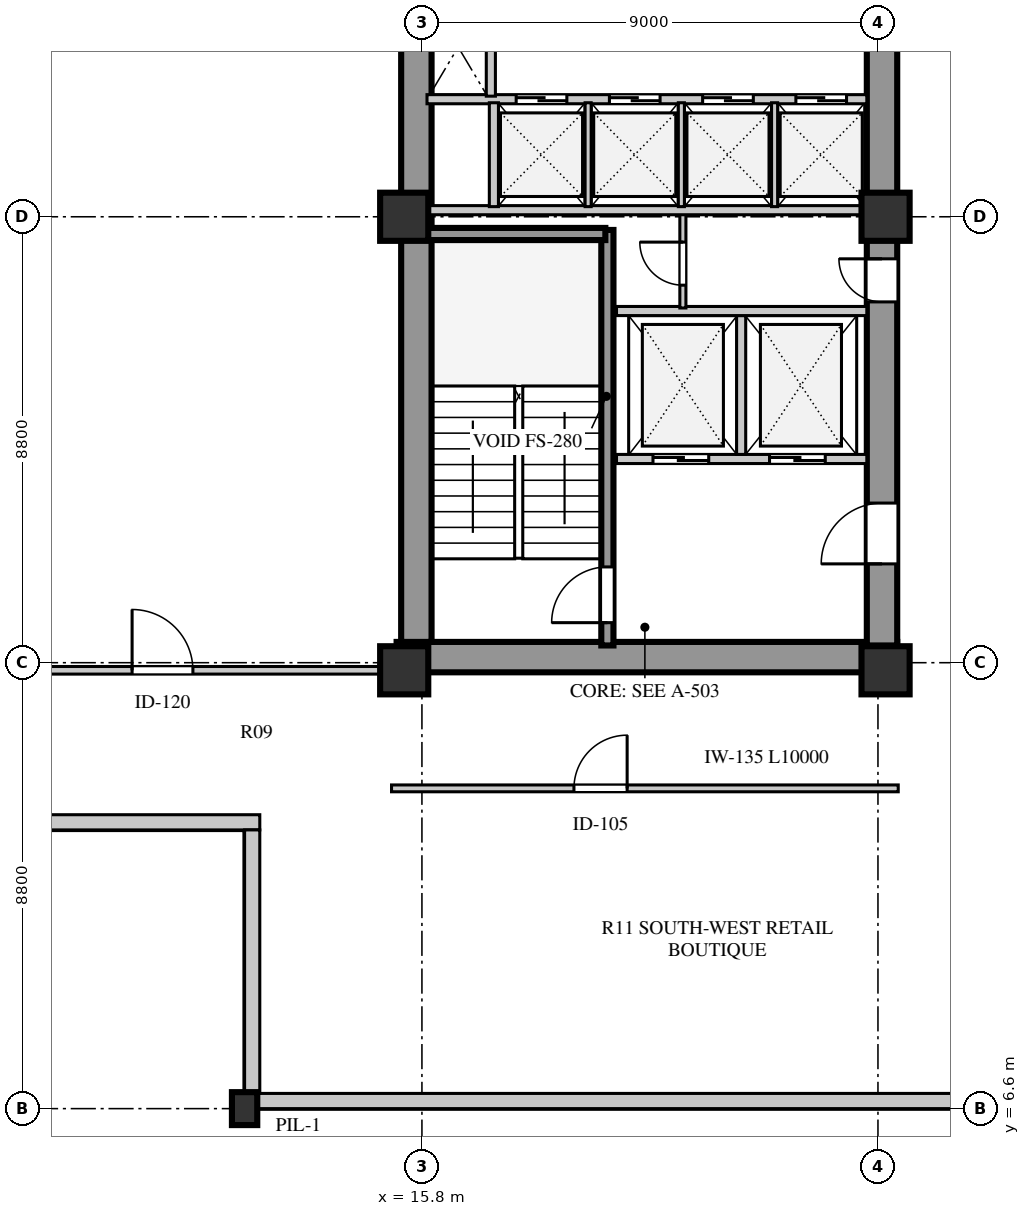
"""IFC4 building model, lengths in metres.
Left out: names, types, materials, properties, quantities, classifications, styles, units other than length and angle.
Written with IfcOpenShell. Run it as: python <this file> out.ifc"""

import sys

from ifc_helpers import new_model, si_unit, direction, frame, frame_2d, origin, origin_2d, place, context, subcontext, project, spatial, rectangle, extrude, element, fill, save


model = new_model("IFC4")
c1 = context("Model", 3, precision=1e-05, world=origin(), true_north=direction((0.0, 1.0)))
c2 = subcontext(c1, "Body", "Model", "MODEL_VIEW")
j1 = project(units=[si_unit("LENGTHUNIT", "METRE"), si_unit("PLANEANGLEUNIT", "RADIAN")], contexts=[c1])
p1 = place(None, origin())
s1 = spatial("IfcSite", under=j1, at=p1, CompositionType="ELEMENT")
p2 = place(p1, origin())
s2 = spatial("IfcBuilding", under=s1, at=p2, CompositionType="ELEMENT")
p3 = place(p2, frame((0.0, 0.0, 12.5)))
s3 = spatial("IfcBuildingStorey", under=s2, at=p3, CompositionType="ELEMENT", Elevation=12.5)
p4 = place(p3, frame((15.3, 15.51, 0.0), z_axis=(0.0, 0.0, 1.0), x_axis=(1.0, 0.0, 0.0)))
e1 = element("IfcWall", 1, at=p4, inside=s3, PredefinedType="SHEAR", context=c2, shape_type="SweptSolid", body=[
    extrude(rectangle(XDim=9.88, YDim=0.6, at=frame_2d((4.94, 0.0))), origin(), (0.0, 0.0, 1.0), 4.22),
])
p5 = place(p3, frame((15.69, 15.81, 0.0), z_axis=(0.0, 0.0, 1.0), x_axis=(0.0, 1.0, 0.0)))
e2 = element("IfcWall", 2, at=p5, inside=s3, PredefinedType="SHEAR", context=c2, shape_type="SweptSolid", body=[
    extrude(rectangle(XDim=25.63, YDim=0.6, at=frame_2d((12.815, 0.0))), origin(), (0.0, 0.0, 1.0), 4.22),
])
p6 = place(p3, frame((24.88, 15.74, 0.0), z_axis=(0.0, 0.0, 1.0), x_axis=(0.0, 1.0, 0.0)))
e3 = element("IfcWall", 3, at=p6, inside=s3, PredefinedType="SHEAR", context=c2, shape_type="SweptSolid", body=[
    extrude(rectangle(XDim=25.76, YDim=0.6, at=frame_2d((12.88, 0.0))), origin(), (0.0, 0.0, 1.0), 4.22),
])
p7 = place(p6, frame((1.61, 0.0, 0.0)))
e4 = element("IfcOpeningElement", 4, at=p7, cuts=e3, PredefinedType="OPENING", context=c2, shape_type="SweptSolid", body=[
    extrude(rectangle(XDim=1.2, YDim=2.1, at=frame_2d((0.6, 1.05))), frame((0.0, 0.31, 0.0), z_axis=(0.0, -1.0, 0.0), x_axis=(1.0, 0.0, 0.0)), (0.0, 0.0, 1.0), 0.62),
])
p8 = place(p6, frame((6.78, 0.0, 0.0)))
e5 = element("IfcOpeningElement", 5, at=p8, cuts=e3, PredefinedType="OPENING", context=c2, shape_type="SweptSolid", body=[
    extrude(rectangle(XDim=0.85, YDim=2.06, at=frame_2d((0.425, 1.03))), frame((0.0, 0.31, 0.0), z_axis=(0.0, -1.0, 0.0), x_axis=(1.0, 0.0, 0.0)), (0.0, 0.0, 1.0), 0.62),
])
p9 = place(p6, frame((12.11, 0.0, 0.0)))
e6 = element("IfcOpeningElement", 6, at=p9, cuts=e3, PredefinedType="OPENING", context=c2, shape_type="SweptSolid", body=[
    extrude(rectangle(XDim=1.5, YDim=2.12, at=frame_2d((0.75, 1.06))), frame((0.0, 0.31, 0.0), z_axis=(0.0, -1.0, 0.0), x_axis=(1.0, 0.0, 0.0)), (0.0, 0.0, 1.0), 0.62),
])
p10 = place(p6, frame((20.11, 0.0, 0.0)))
e7 = element("IfcOpeningElement", 7, at=p10, cuts=e3, PredefinedType="OPENING", context=c2, shape_type="SweptSolid", body=[
    extrude(rectangle(XDim=1.2, YDim=2.12, at=frame_2d((0.6, 1.06))), frame((0.0, 0.31, 0.0), z_axis=(0.0, -1.0, 0.0), x_axis=(1.0, 0.0, 0.0)), (0.0, 0.0, 1.0), 0.62),
])
p11 = place(p6, frame((24.01, 0.0, 0.0)))
e8 = element("IfcOpeningElement", 8, at=p11, cuts=e3, PredefinedType="OPENING", context=c2, shape_type="SweptSolid", body=[
    extrude(rectangle(XDim=0.95, YDim=2.1, at=frame_2d((0.475, 1.05))), frame((0.0, 0.31, 0.0), z_axis=(0.0, -1.0, 0.0), x_axis=(1.0, 0.0, 0.0)), (0.0, 0.0, 1.0), 0.62),
])
for number, where, z_axis, x_axis in (
    (9, (15.45, 15.25, 0.0), (0.0, 0.0, 1.0), (1.0, 0.0, 0.0)),
    (10, (15.45, 24.2, 0.0), (0.0, 0.0, 1.0), (1.0, 0.0, 0.0)),
    (11, (24.95, 15.25, 0.0), (0.0, 0.0, 1.0), (1.0, 0.0, 0.0)),
    (12, (24.95, 24.2, 0.0), (0.0, 0.0, 1.0), (1.0, 0.0, 0.0)),
):
    element("IfcColumn", number, at=place(p3, frame(where, z_axis=z_axis, x_axis=x_axis)), inside=s3, PredefinedType="COLUMN", context=c2, shape_type="SweptSolid", body=[
        extrude(rectangle(XDim=0.95, YDim=0.95, at=origin_2d()), origin(), (0.0, 0.0, 1.0), 4.22),
    ])
p12 = place(p3, frame((12.3, 6.6, 0.0), z_axis=(0.0, 0.0, 1.0), x_axis=(1.0, 0.0, 0.0)))
e13 = element("IfcColumn", 13, at=p12, inside=s3, PredefinedType="PILASTER", context=c2, shape_type="SweptSolid", body=[
    extrude(rectangle(XDim=0.5, YDim=0.65, at=origin_2d()), origin(), (0.0, 0.0, 1.0), 4.22),
])
p13 = place(p3, frame((12.3, 6.75, 0.0), z_axis=(0.0, 0.0, 1.0), x_axis=(1.0, 0.0, 0.0)))
e14 = element("IfcWall", 14, at=p13, inside=s3, PredefinedType="STANDARD", context=c2, shape_type="SweptSolid", body=[
    extrude(rectangle(XDim=34.0, YDim=0.3, at=frame_2d((17.0, 0.0))), origin(), (0.0, 0.0, 1.0), 4.22),
])
p14 = place(p13, frame((16.4, 0.0, 0.8)))
e15 = element("IfcOpeningElement", 15, at=p14, cuts=e14, PredefinedType="OPENING", context=c2, shape_type="SweptSolid", body=[
    extrude(rectangle(XDim=1.2, YDim=1.75, at=frame_2d((0.6, 0.875))), frame((0.0, 0.16, 0.0), z_axis=(0.0, -1.0, 0.0), x_axis=(1.0, 0.0, 0.0)), (0.0, 0.0, 1.0), 0.32),
])
p15 = place(p3, frame((6.8, 12.25, 0.0), z_axis=(0.0, 0.0, 1.0), x_axis=(1.0, 0.0, 0.0)))
e16 = element("IfcWall", 16, at=p15, inside=s3, PredefinedType="STANDARD", context=c2, shape_type="SweptSolid", body=[
    extrude(rectangle(XDim=5.8, YDim=0.3, at=frame_2d((2.9, 0.0))), origin(), (0.0, 0.0, 1.0), 4.22),
])
p16 = place(p3, frame((12.45, 12.1, 0.0), z_axis=(0.0, 0.0, 1.0), x_axis=(0.0, -1.0, 0.0)))
e17 = element("IfcWall", 17, at=p16, inside=s3, PredefinedType="STANDARD", context=c2, shape_type="SweptSolid", body=[
    extrude(rectangle(XDim=5.2, YDim=0.3, at=frame_2d((2.6, 0.0))), origin(), (0.0, 0.0, 1.0), 4.22),
])
p17 = place(p3, frame((19.46, 15.74, 0.0), z_axis=(0.0, 0.0, 1.0), x_axis=(0.0, 1.0, 0.0)))
e18 = element("IfcWall", 18, at=p17, inside=s3, PredefinedType="SHEAR", context=c2, shape_type="SweptSolid", body=[
    extrude(rectangle(XDim=8.2, YDim=0.24, at=frame_2d((4.1, 0.0))), origin(), (0.0, 0.0, 1.0), 4.5),
])
p18 = place(p17, frame((0.45, 0.0, 0.0)))
e19 = element("IfcOpeningElement", 19, at=p18, cuts=e18, PredefinedType="OPENING", context=c2, shape_type="SweptSolid", body=[
    extrude(rectangle(XDim=1.1, YDim=2.1, at=frame_2d((0.55, 1.05))), frame((0.0, 0.13, 0.0), z_axis=(0.0, -1.0, 0.0), x_axis=(1.0, 0.0, 0.0)), (0.0, 0.0, 1.0), 0.26),
])
p19 = place(p3, frame((15.9, 23.86, 0.0), z_axis=(0.0, 0.0, 1.0), x_axis=(1.0, 0.0, 0.0)))
e20 = element("IfcWall", 20, at=p19, inside=s3, PredefinedType="SHEAR", context=c2, shape_type="SweptSolid", body=[
    extrude(rectangle(XDim=3.52, YDim=0.24, at=frame_2d((1.76, 0.0))), origin(), (0.0, 0.0, 1.0), 4.5),
])
p20 = place(p3, frame((19.64, 19.42, 0.0), z_axis=(0.0, 0.0, 1.0), x_axis=(1.0, 0.0, 0.0)))
e21 = element("IfcWall", 21, at=p20, inside=s3, PredefinedType="SOLIDWALL", context=c2, shape_type="SweptSolid", body=[
    extrude(rectangle(XDim=4.94, YDim=0.18, at=frame_2d((2.47, 0.0))), origin(), (0.0, 0.0, 1.0), 4.22),
])
p21 = place(p20, frame((0.72, 0.0, 0.0)))
e22 = element("IfcOpeningElement", 22, at=p21, cuts=e21, PredefinedType="OPENING", context=c2, shape_type="SweptSolid", body=[
    extrude(rectangle(XDim=1.1, YDim=2.1, at=frame_2d((0.55, 1.05))), frame((0.0, 0.1, 0.0), z_axis=(0.0, -1.0, 0.0), x_axis=(1.0, 0.0, 0.0)), (0.0, 0.0, 1.0), 0.2),
])
p22 = place(p20, frame((3.02, 0.0, 0.0)))
e23 = element("IfcOpeningElement", 23, at=p22, cuts=e21, PredefinedType="OPENING", context=c2, shape_type="SweptSolid", body=[
    extrude(rectangle(XDim=1.1, YDim=2.1, at=frame_2d((0.55, 1.05))), frame((0.0, 0.1, 0.0), z_axis=(0.0, -1.0, 0.0), x_axis=(1.0, 0.0, 0.0)), (0.0, 0.0, 1.0), 0.2),
])
p23 = place(p3, frame((22.1, 19.51, 0.0), z_axis=(0.0, 0.0, 1.0), x_axis=(0.0, 1.0, 0.0)))
e24 = element("IfcWall", 24, at=p23, inside=s3, PredefinedType="SOLIDWALL", context=c2, shape_type="SweptSolid", body=[
    extrude(rectangle(XDim=2.74, YDim=0.18, at=frame_2d((1.37, 0.0))), origin(), (0.0, 0.0, 1.0), 4.22),
])
p24 = place(p3, frame((19.64, 22.34, 0.0), z_axis=(0.0, 0.0, 1.0), x_axis=(1.0, 0.0, 0.0)))
e25 = element("IfcWall", 25, at=p24, inside=s3, PredefinedType="SOLIDWALL", context=c2, shape_type="SweptSolid", body=[
    extrude(rectangle(XDim=4.94, YDim=0.18, at=frame_2d((2.47, 0.0))), origin(), (0.0, 0.0, 1.0), 4.22),
])
p25 = place(p3, frame((20.95, 22.4, 0.0), z_axis=(0.0, 0.0, 1.0), x_axis=(0.0, 1.0, 0.0)))
e26 = element("IfcWall", 26, at=p25, inside=s3, PredefinedType="PARTITIONING", context=c2, shape_type="SweptSolid", body=[
    extrude(rectangle(XDim=1.88, YDim=0.12, at=frame_2d((0.94, 0.0))), origin(), (0.0, 0.0, 1.0), 4.22),
])
p26 = place(p25, frame((0.45, 0.0, 0.0)))
e27 = element("IfcOpeningElement", 27, at=p26, cuts=e26, PredefinedType="OPENING", context=c2, shape_type="SweptSolid", body=[
    extrude(rectangle(XDim=0.85, YDim=2.06, at=frame_2d((0.425, 1.03))), frame((0.0, 0.07, 0.0), z_axis=(0.0, -1.0, 0.0), x_axis=(1.0, 0.0, 0.0)), (0.0, 0.0, 1.0), 0.14),
])
p27 = place(p3, frame((15.9, 26.52, 0.0), z_axis=(0.0, 0.0, 1.0), x_axis=(1.0, 0.0, 0.0)))
e28 = element("IfcWall", 28, at=p27, inside=s3, PredefinedType="SOLIDWALL", context=c2, shape_type="SweptSolid", body=[
    extrude(rectangle(XDim=8.68, YDim=0.18, at=frame_2d((4.34, 0.0))), origin(), (0.0, 0.0, 1.0), 4.22),
])
p28 = place(p27, frame((1.76, 0.0, 0.0)))
e29 = element("IfcOpeningElement", 29, at=p28, cuts=e28, PredefinedType="OPENING", context=c2, shape_type="SweptSolid", body=[
    extrude(rectangle(XDim=1.0, YDim=2.1, at=frame_2d((0.5, 1.05))), frame((0.0, 0.1, 0.0), z_axis=(0.0, -1.0, 0.0), x_axis=(1.0, 0.0, 0.0)), (0.0, 0.0, 1.0), 0.2),
])
p29 = place(p27, frame((3.6, 0.0, 0.0)))
e30 = element("IfcOpeningElement", 30, at=p29, cuts=e28, PredefinedType="OPENING", context=c2, shape_type="SweptSolid", body=[
    extrude(rectangle(XDim=1.0, YDim=2.1, at=frame_2d((0.5, 1.05))), frame((0.0, 0.1, 0.0), z_axis=(0.0, -1.0, 0.0), x_axis=(1.0, 0.0, 0.0)), (0.0, 0.0, 1.0), 0.2),
])
p30 = place(p27, frame((5.44, 0.0, 0.0)))
e31 = element("IfcOpeningElement", 31, at=p30, cuts=e28, PredefinedType="OPENING", context=c2, shape_type="SweptSolid", body=[
    extrude(rectangle(XDim=1.0, YDim=2.1, at=frame_2d((0.5, 1.05))), frame((0.0, 0.1, 0.0), z_axis=(0.0, -1.0, 0.0), x_axis=(1.0, 0.0, 0.0)), (0.0, 0.0, 1.0), 0.2),
])
p31 = place(p27, frame((7.28, 0.0, 0.0)))
e32 = element("IfcOpeningElement", 32, at=p31, cuts=e28, PredefinedType="OPENING", context=c2, shape_type="SweptSolid", body=[
    extrude(rectangle(XDim=1.0, YDim=2.1, at=frame_2d((0.5, 1.05))), frame((0.0, 0.1, 0.0), z_axis=(0.0, -1.0, 0.0), x_axis=(1.0, 0.0, 0.0)), (0.0, 0.0, 1.0), 0.2),
])
p32 = place(p3, frame((15.9, 24.33, 0.0), z_axis=(0.0, 0.0, 1.0), x_axis=(1.0, 0.0, 0.0)))
e33 = element("IfcWall", 33, at=p32, inside=s3, PredefinedType="SOLIDWALL", context=c2, shape_type="SweptSolid", body=[
    extrude(rectangle(XDim=8.68, YDim=0.18, at=frame_2d((4.34, 0.0))), origin(), (0.0, 0.0, 1.0), 3.42),
])
p33 = place(p3, frame((17.22, 24.4, 0.0), z_axis=(0.0, 0.0, 1.0), x_axis=(0.0, 1.0, 0.0)))
e34 = element("IfcWall", 34, at=p33, inside=s3, PredefinedType="SOLIDWALL", context=c2, shape_type="SweptSolid", body=[
    extrude(rectangle(XDim=2.05, YDim=0.18, at=frame_2d((1.025, 0.0))), origin(), (0.0, 0.0, 1.0), 4.22),
])
for number, where, z_axis, x_axis in (
    (35, (19.08, 24.4, 0.0), (0.0, 0.0, 1.0), (0.0, 1.0, 0.0)),
    (36, (20.92, 24.4, 0.0), (0.0, 0.0, 1.0), (0.0, 1.0, 0.0)),
    (37, (22.76, 24.4, 0.0), (0.0, 0.0, 1.0), (0.0, 1.0, 0.0)),
):
    element("IfcWall", number, at=place(p3, frame(where, z_axis=z_axis, x_axis=x_axis)), inside=s3, PredefinedType="PARTITIONING", context=c2, shape_type="SweptSolid", body=[
        extrude(rectangle(XDim=2.05, YDim=0.12, at=frame_2d((1.025, 0.0))), origin(), (0.0, 0.0, 1.0), 4.22),
    ])
p34 = place(p3, frame((17.16, 26.58, 0.0), z_axis=(0.0, 0.0, 1.0), x_axis=(0.0, 1.0, 0.0)))
e38 = element("IfcWall", 38, at=p34, inside=s3, PredefinedType="SOLIDWALL", context=c2, shape_type="SweptSolid", body=[
    extrude(rectangle(XDim=4.02, YDim=0.18, at=frame_2d((2.01, 0.0))), origin(), (0.0, 0.0, 1.0), 4.22),
])
p35 = place(p34, frame((2.35, 0.0, 0.0)))
e39 = element("IfcOpeningElement", 39, at=p35, cuts=e38, PredefinedType="OPENING", context=c2, shape_type="SweptSolid", body=[
    extrude(rectangle(XDim=0.85, YDim=2.06, at=frame_2d((0.425, 1.03))), frame((0.0, 0.1, 0.0), z_axis=(0.0, -1.0, 0.0), x_axis=(1.0, 0.0, 0.0)), (0.0, 0.0, 1.0), 0.2),
])
p36 = place(p3, frame((6.88, 15.25, 0.0), z_axis=(0.0, 0.0, 1.0), x_axis=(1.0, 0.0, 0.0)))
e40 = element("IfcWall", 40, at=p36, inside=s3, PredefinedType="PARTITIONING", context=c2, shape_type="SweptSolid", body=[
    extrude(rectangle(XDim=8.32, YDim=0.15, at=frame_2d((4.16, 0.0))), origin(), (0.0, 0.0, 1.0), 3.72),
])
p37 = place(p36, frame((3.2, 0.0, 0.0)))
e41 = element("IfcOpeningElement", 41, at=p37, cuts=e40, PredefinedType="OPENING", context=c2, shape_type="SweptSolid", body=[
    extrude(rectangle(XDim=1.2, YDim=2.1, at=frame_2d((0.6, 1.05))), frame((0.0, 0.085, 0.0), z_axis=(0.0, -1.0, 0.0), x_axis=(1.0, 0.0, 0.0)), (0.0, 0.0, 1.0), 0.17),
])
p38 = place(p3, frame((15.2, 12.92, 0.0), z_axis=(0.0, 0.0, 1.0), x_axis=(1.0, 0.0, 0.0)))
e42 = element("IfcWall", 42, at=p38, inside=s3, PredefinedType="PARTITIONING", context=c2, shape_type="SweptSolid", body=[
    extrude(rectangle(XDim=10.0, YDim=0.135, at=frame_2d((5.0, 0.0))), origin(), (0.0, 0.0, 1.0), 4.22),
])
p39 = place(p38, frame((3.6, 0.0, 0.0)))
e43 = element("IfcOpeningElement", 43, at=p39, cuts=e42, PredefinedType="OPENING", context=c2, shape_type="SweptSolid", body=[
    extrude(rectangle(XDim=1.05, YDim=2.1, at=frame_2d((0.525, 1.05))), frame((0.0, 0.078, 0.0), z_axis=(0.0, -1.0, 0.0), x_axis=(1.0, 0.0, 0.0)), (0.0, 0.0, 1.0), 0.155),
])
p40 = place(p18, origin())
e44 = element("IfcDoor", 44, at=p40, inside=s3, OperationType="SINGLE_SWING_LEFT", PredefinedType="DOOR", context=c2, shape_type="SweptSolid", body=[
    extrude(rectangle(XDim=1.1, YDim=2.1, at=frame_2d((0.55, 1.05))), frame((0.0, 0.025, 0.0), z_axis=(0.0, -1.0, 0.0), x_axis=(1.0, 0.0, 0.0)), (0.0, 0.0, 1.0), 0.05),
])
fill(e19, e44)
p41 = place(p21, origin())
e45 = element("IfcDoor", 45, at=p41, inside=s3, OperationType="DOUBLE_DOOR_SLIDING", PredefinedType="DOOR", context=c2, shape_type="SweptSolid", body=[
    extrude(rectangle(XDim=1.1, YDim=2.1, at=frame_2d((0.55, 1.05))), frame((0.0, 0.025, 0.0), z_axis=(0.0, -1.0, 0.0), x_axis=(1.0, 0.0, 0.0)), (0.0, 0.0, 1.0), 0.05),
])
fill(e22, e45)
p42 = place(p22, origin())
e46 = element("IfcDoor", 46, at=p42, inside=s3, OperationType="DOUBLE_DOOR_SLIDING", PredefinedType="DOOR", context=c2, shape_type="SweptSolid", body=[
    extrude(rectangle(XDim=1.1, YDim=2.1, at=frame_2d((0.55, 1.05))), frame((0.0, 0.025, 0.0), z_axis=(0.0, -1.0, 0.0), x_axis=(1.0, 0.0, 0.0)), (0.0, 0.0, 1.0), 0.05),
])
fill(e23, e46)
p43 = place(p7, frame((1.2, 0.0, 0.0), z_axis=(0.0, 0.0, 1.0), x_axis=(-1.0, 0.0, 0.0)))
e47 = element("IfcDoor", 47, at=p43, inside=s3, OperationType="SINGLE_SWING_RIGHT", PredefinedType="DOOR", context=c2, shape_type="SweptSolid", body=[
    extrude(rectangle(XDim=1.2, YDim=2.1, at=frame_2d((0.6, 1.05))), frame((0.0, 0.025, 0.0), z_axis=(0.0, -1.0, 0.0), x_axis=(1.0, 0.0, 0.0)), (0.0, 0.0, 1.0), 0.05),
])
fill(e4, e47)
p44 = place(p26, origin())
e48 = element("IfcDoor", 48, at=p44, inside=s3, OperationType="SINGLE_SWING_RIGHT", PredefinedType="DOOR", context=c2, shape_type="SweptSolid", body=[
    extrude(rectangle(XDim=0.85, YDim=2.06, at=frame_2d((0.425, 1.03))), frame((0.0, 0.025, 0.0), z_axis=(0.0, -1.0, 0.0), x_axis=(1.0, 0.0, 0.0)), (0.0, 0.0, 1.0), 0.05),
])
fill(e27, e48)
p45 = place(p8, frame((0.85, 0.0, 0.0), z_axis=(0.0, 0.0, 1.0), x_axis=(-1.0, 0.0, 0.0)))
e49 = element("IfcDoor", 49, at=p45, inside=s3, OperationType="SINGLE_SWING_LEFT", PredefinedType="DOOR", context=c2, shape_type="SweptSolid", body=[
    extrude(rectangle(XDim=0.85, YDim=2.06, at=frame_2d((0.425, 1.03))), frame((0.0, 0.025, 0.0), z_axis=(0.0, -1.0, 0.0), x_axis=(1.0, 0.0, 0.0)), (0.0, 0.0, 1.0), 0.05),
])
fill(e5, e49)
p46 = place(p28, origin())
e50 = element("IfcDoor", 50, at=p46, inside=s3, OperationType="DOUBLE_DOOR_SLIDING", PredefinedType="DOOR", context=c2, shape_type="SweptSolid", body=[
    extrude(rectangle(XDim=1.0, YDim=2.1, at=frame_2d((0.5, 1.05))), frame((0.0, 0.025, 0.0), z_axis=(0.0, -1.0, 0.0), x_axis=(1.0, 0.0, 0.0)), (0.0, 0.0, 1.0), 0.05),
])
fill(e29, e50)
p47 = place(p29, origin())
e51 = element("IfcDoor", 51, at=p47, inside=s3, OperationType="DOUBLE_DOOR_SLIDING", PredefinedType="DOOR", context=c2, shape_type="SweptSolid", body=[
    extrude(rectangle(XDim=1.0, YDim=2.1, at=frame_2d((0.5, 1.05))), frame((0.0, 0.025, 0.0), z_axis=(0.0, -1.0, 0.0), x_axis=(1.0, 0.0, 0.0)), (0.0, 0.0, 1.0), 0.05),
])
fill(e30, e51)
p48 = place(p30, origin())
e52 = element("IfcDoor", 52, at=p48, inside=s3, OperationType="DOUBLE_DOOR_SLIDING", PredefinedType="DOOR", context=c2, shape_type="SweptSolid", body=[
    extrude(rectangle(XDim=1.0, YDim=2.1, at=frame_2d((0.5, 1.05))), frame((0.0, 0.025, 0.0), z_axis=(0.0, -1.0, 0.0), x_axis=(1.0, 0.0, 0.0)), (0.0, 0.0, 1.0), 0.05),
])
fill(e31, e52)
p49 = place(p31, origin())
e53 = element("IfcDoor", 53, at=p49, inside=s3, OperationType="DOUBLE_DOOR_SLIDING", PredefinedType="DOOR", context=c2, shape_type="SweptSolid", body=[
    extrude(rectangle(XDim=1.0, YDim=2.1, at=frame_2d((0.5, 1.05))), frame((0.0, 0.025, 0.0), z_axis=(0.0, -1.0, 0.0), x_axis=(1.0, 0.0, 0.0)), (0.0, 0.0, 1.0), 0.05),
])
fill(e32, e53)
p50 = place(p37, origin())
e54 = element("IfcDoor", 54, at=p50, inside=s3, OperationType="SINGLE_SWING_LEFT", PredefinedType="DOOR", context=c2, shape_type="SweptSolid", body=[
    extrude(rectangle(XDim=1.2, YDim=2.1, at=frame_2d((0.6, 1.05))), frame((0.0, 0.025, 0.0), z_axis=(0.0, -1.0, 0.0), x_axis=(1.0, 0.0, 0.0)), (0.0, 0.0, 1.0), 0.05),
])
fill(e41, e54)
p51 = place(p39, frame((1.05, 0.0, 0.0), z_axis=(0.0, 0.0, 1.0), x_axis=(-1.0, 0.0, 0.0)))
e55 = element("IfcDoor", 55, at=p51, inside=s3, OperationType="SINGLE_SWING_LEFT", PredefinedType="DOOR", context=c2, shape_type="SweptSolid", body=[
    extrude(rectangle(XDim=1.05, YDim=2.1, at=frame_2d((0.525, 1.05))), frame((0.0, 0.025, 0.0), z_axis=(0.0, -1.0, 0.0), x_axis=(1.0, 0.0, 0.0)), (0.0, 0.0, 1.0), 0.05),
])
fill(e43, e55)
save(model, sys.argv[1])
